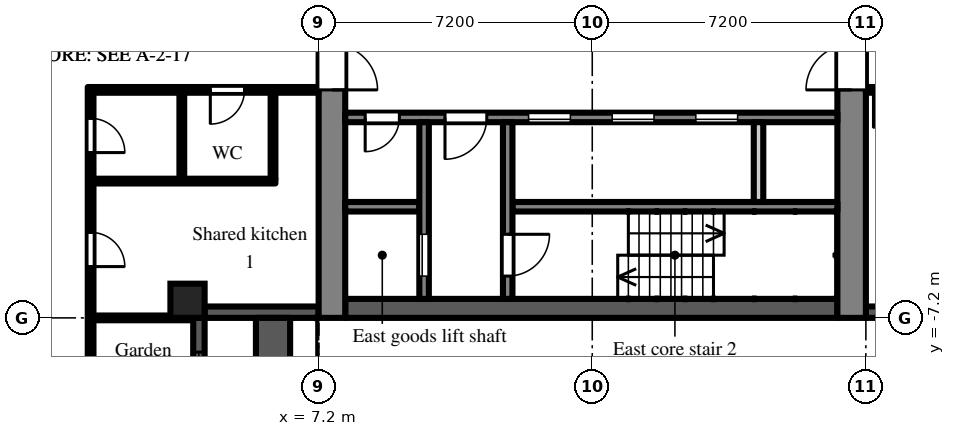
"""IFC4 building model, lengths in metres.
Left out: names, types, materials, properties, quantities, classifications, styles, units other than length and angle.
Written with IfcOpenShell. Run it as: python <this file> out.ifc"""

import sys

from ifc_helpers import new_model, si_unit, direction, frame, frame_2d, origin, origin_2d, place, context, subcontext, project, spatial, rectangle, extrude, element, fill, save


model = new_model("IFC4")
c1 = context("Model", 3, precision=1e-05, world=origin(), true_north=direction((0.0, 1.0)))
c2 = subcontext(c1, "Body", "Model", "MODEL_VIEW")
j1 = project(units=[si_unit("LENGTHUNIT", "METRE"), si_unit("PLANEANGLEUNIT", "RADIAN")], contexts=[c1])
p1 = place(None, origin())
s1 = spatial("IfcSite", under=j1, at=p1, CompositionType="ELEMENT")
p2 = place(p1, origin())
s2 = spatial("IfcBuilding", under=s1, at=p2, CompositionType="ELEMENT")
p3 = place(p2, frame((0.0, 0.0, 108.9)))
s3 = spatial("IfcBuildingStorey", under=s2, at=p3, CompositionType="ELEMENT", Elevation=108.9)
p4 = place(p3, frame((3.75, -6.75, 0.0), z_axis=(0.0, 0.0, 1.0), x_axis=(1.0, 0.0, 0.0)))
e1 = element("IfcColumn", 1, at=p4, inside=s3, PredefinedType="COLUMN", context=c2, shape_type="SweptSolid", body=[
    extrude(rectangle(XDim=0.9, YDim=0.9, at=origin_2d()), origin(), (0.0, 0.0, 1.0), 3.0),
])
p5 = place(p3, frame((21.6, -7.05, 0.0), z_axis=(0.0, 0.0, 1.0), x_axis=(1.0, 0.0, 0.0)))
e2 = element("IfcWall", 2, at=p5, inside=s3, PredefinedType="SOLIDWALL", context=c2, shape_type="SweptSolid", body=[
    extrude(rectangle(XDim=2.7, YDim=0.3, at=frame_2d((1.35, 0.0))), origin(), (0.0, 0.0, 1.0), 2.2),
])
p6 = place(p5, frame((0.75, 0.0, 0.2)))
e3 = element("IfcOpeningElement", 3, at=p6, cuts=e2, PredefinedType="OPENING", context=c2, shape_type="SweptSolid", body=[
    extrude(rectangle(XDim=1.2, YDim=1.85, at=frame_2d((0.6, 0.925))), frame((0.0, 0.16, 0.0), z_axis=(0.0, -1.0, 0.0), x_axis=(1.0, 0.0, 0.0)), (0.0, 0.0, 1.0), 0.32),
])
p7 = place(p3, frame((4.05, -14.4, 0.0), z_axis=(0.0, 0.0, 1.0), x_axis=(0.0, 1.0, 0.0)))
e4 = element("IfcWall", 4, at=p7, inside=s3, PredefinedType="SOLIDWALL", context=c2, shape_type="SweptSolid", body=[
    extrude(rectangle(XDim=7.2, YDim=0.3, at=frame_2d((3.6, 0.0))), origin(), (0.0, 0.0, 1.0), 2.55),
])
p8 = place(p7, frame((3.0, 0.0, 0.0)))
e5 = element("IfcOpeningElement", 5, at=p8, cuts=e4, PredefinedType="OPENING", context=c2, shape_type="SweptSolid", body=[
    extrude(rectangle(XDim=1.2, YDim=2.05, at=frame_2d((0.6, 1.025))), frame((0.0, 0.16, 0.0), z_axis=(0.0, -1.0, 0.0), x_axis=(1.0, 0.0, 0.0)), (0.0, 0.0, 1.0), 0.32),
])
p9 = place(p7, frame((0.9, 0.0, 0.2)))
e6 = element("IfcOpeningElement", 6, at=p9, cuts=e4, PredefinedType="OPENING", context=c2, shape_type="SweptSolid", body=[
    extrude(rectangle(XDim=1.8, YDim=1.85, at=frame_2d((0.9, 0.925))), frame((0.0, 0.16, 0.0), z_axis=(0.0, -1.0, 0.0), x_axis=(1.0, 0.0, 0.0)), (0.0, 0.0, 1.0), 0.32),
])
p10 = place(p7, frame((4.5, 0.0, 0.2)))
e7 = element("IfcOpeningElement", 7, at=p10, cuts=e4, PredefinedType="OPENING", context=c2, shape_type="SweptSolid", body=[
    extrude(rectangle(XDim=1.8, YDim=1.85, at=frame_2d((0.9, 0.925))), frame((0.0, 0.16, 0.0), z_axis=(0.0, -1.0, 0.0), x_axis=(1.0, 0.0, 0.0)), (0.0, 0.0, 1.0), 0.32),
])
p11 = place(p3, frame((4.2, -7.05, 0.0), z_axis=(0.0, 0.0, 1.0), x_axis=(1.0, 0.0, 0.0)))
e8 = element("IfcWall", 8, at=p11, inside=s3, PredefinedType="SOLIDWALL", context=c2, shape_type="SweptSolid", body=[
    extrude(rectangle(XDim=3.0, YDim=0.3, at=frame_2d((1.5, 0.0))), origin(), (0.0, 0.0, 1.0), 2.55),
])
p12 = place(p3, frame((6.0, -14.4, 0.0), z_axis=(0.0, 0.0, 1.0), x_axis=(0.0, 1.0, 0.0)))
e9 = element("IfcWall", 9, at=p12, inside=s3, PredefinedType="PARAPET", context=c2, shape_type="SweptSolid", body=[
    extrude(rectangle(XDim=7.2, YDim=0.9, at=frame_2d((3.6, 0.0))), origin(), (0.0, 0.0, 1.0), 0.8),
])
p13 = place(p3, frame((7.55, -7.2, 0.0), z_axis=(0.0, 0.0, 1.0), x_axis=(0.0, 1.0, 0.0)))
e10 = element("IfcWall", 10, at=p13, inside=s3, PredefinedType="SHEAR", context=c2, shape_type="SweptSolid", body=[
    extrude(rectangle(XDim=14.4, YDim=0.7, at=frame_2d((7.2, 0.0))), origin(), (0.0, 0.0, 1.0), 2.55),
])
p14 = place(p13, frame((6.0, 0.0, 0.0)))
e11 = element("IfcOpeningElement", 11, at=p14, cuts=e10, PredefinedType="OPENING", context=c2, shape_type="SweptSolid", body=[
    extrude(rectangle(XDim=2.4, YDim=2.2, at=frame_2d((1.2, 1.1))), frame((0.0, 0.36, 0.0), z_axis=(0.0, -1.0, 0.0), x_axis=(1.0, 0.0, 0.0)), (0.0, 0.0, 1.0), 0.72),
])
p15 = place(p3, frame((21.225, -7.2, 0.0), z_axis=(0.0, 0.0, 1.0), x_axis=(0.0, 1.0, 0.0)))
e12 = element("IfcWall", 12, at=p15, inside=s3, PredefinedType="SHEAR", context=c2, shape_type="SweptSolid", body=[
    extrude(rectangle(XDim=14.4, YDim=0.75, at=frame_2d((7.2, 0.0))), origin(), (0.0, 0.0, 1.0), 2.55),
])
p16 = place(p15, frame((6.0, 0.0, 0.0)))
e13 = element("IfcOpeningElement", 13, at=p16, cuts=e12, PredefinedType="OPENING", context=c2, shape_type="SweptSolid", body=[
    extrude(rectangle(XDim=2.4, YDim=2.2, at=frame_2d((1.2, 1.1))), frame((0.0, 0.385, 0.0), z_axis=(0.0, -1.0, 0.0), x_axis=(1.0, 0.0, 0.0)), (0.0, 0.0, 1.0), 0.77),
])
p17 = place(p3, frame((7.9, -6.95, 0.0), z_axis=(0.0, 0.0, 1.0), x_axis=(1.0, 0.0, 0.0)))
e14 = element("IfcWall", 14, at=p17, inside=s3, PredefinedType="SHEAR", context=c2, shape_type="SweptSolid", body=[
    extrude(rectangle(XDim=12.95, YDim=0.5, at=frame_2d((6.475, 0.0))), origin(), (0.0, 0.0, 1.0), 2.55),
])
p18 = place(p3, frame((7.9, -1.925, 0.0), z_axis=(0.0, 0.0, 1.0), x_axis=(1.0, 0.0, 0.0)))
e15 = element("IfcWall", 15, at=p18, inside=s3, PredefinedType="SHEAR", context=c2, shape_type="SweptSolid", body=[
    extrude(rectangle(XDim=12.95, YDim=0.25, at=frame_2d((6.475, 0.0))), origin(), (0.0, 0.0, 1.0), 2.55),
])
p19 = place(p18, frame((4.825, 0.0, 0.0)))
e16 = element("IfcOpeningElement", 16, at=p19, cuts=e15, PredefinedType="OPENING", context=c2, shape_type="SweptSolid", body=[
    extrude(rectangle(XDim=1.1, YDim=2.1, at=frame_2d((0.55, 1.05))), frame((0.0, 0.135, 0.0), z_axis=(0.0, -1.0, 0.0), x_axis=(1.0, 0.0, 0.0)), (0.0, 0.0, 1.0), 0.27),
])
p20 = place(p18, frame((7.025, 0.0, 0.0)))
e17 = element("IfcOpeningElement", 17, at=p20, cuts=e15, PredefinedType="OPENING", context=c2, shape_type="SweptSolid", body=[
    extrude(rectangle(XDim=1.1, YDim=2.1, at=frame_2d((0.55, 1.05))), frame((0.0, 0.135, 0.0), z_axis=(0.0, -1.0, 0.0), x_axis=(1.0, 0.0, 0.0)), (0.0, 0.0, 1.0), 0.27),
])
p21 = place(p18, frame((9.225, 0.0, 0.0)))
e18 = element("IfcOpeningElement", 18, at=p21, cuts=e15, PredefinedType="OPENING", context=c2, shape_type="SweptSolid", body=[
    extrude(rectangle(XDim=1.1, YDim=2.1, at=frame_2d((0.55, 1.05))), frame((0.0, 0.135, 0.0), z_axis=(0.0, -1.0, 0.0), x_axis=(1.0, 0.0, 0.0)), (0.0, 0.0, 1.0), 0.27),
])
p22 = place(p18, frame((0.525, 0.0, 0.0)))
e19 = element("IfcOpeningElement", 19, at=p22, cuts=e15, PredefinedType="OPENING", context=c2, shape_type="SweptSolid", body=[
    extrude(rectangle(XDim=0.9, YDim=2.1, at=frame_2d((0.45, 1.05))), frame((0.0, 0.135, 0.0), z_axis=(0.0, -1.0, 0.0), x_axis=(1.0, 0.0, 0.0)), (0.0, 0.0, 1.0), 0.27),
])
p23 = place(p18, frame((2.625, 0.0, 0.0)))
e20 = element("IfcOpeningElement", 20, at=p23, cuts=e15, PredefinedType="OPENING", context=c2, shape_type="SweptSolid", body=[
    extrude(rectangle(XDim=1.1, YDim=2.1, at=frame_2d((0.55, 1.05))), frame((0.0, 0.135, 0.0), z_axis=(0.0, -1.0, 0.0), x_axis=(1.0, 0.0, 0.0)), (0.0, 0.0, 1.0), 0.27),
])
p24 = place(p3, frame((7.9, -4.275, 0.0), z_axis=(0.0, 0.0, 1.0), x_axis=(1.0, 0.0, 0.0)))
e21 = element("IfcWall", 21, at=p24, inside=s3, PredefinedType="SHEAR", context=c2, shape_type="SweptSolid", body=[
    extrude(rectangle(XDim=1.95, YDim=0.25, at=frame_2d((0.975, 0.0))), origin(), (0.0, 0.0, 1.0), 2.55),
])
p25 = place(p3, frame((12.3, -4.275, 0.0), z_axis=(0.0, 0.0, 1.0), x_axis=(1.0, 0.0, 0.0)))
e22 = element("IfcWall", 22, at=p25, inside=s3, PredefinedType="SHEAR", context=c2, shape_type="SweptSolid", body=[
    extrude(rectangle(XDim=8.55, YDim=0.25, at=frame_2d((4.275, 0.0))), origin(), (0.0, 0.0, 1.0), 2.55),
])
p26 = place(p3, frame((9.975, -2.05, 0.0), z_axis=(0.0, 0.0, 1.0), x_axis=(0.0, -1.0, 0.0)))
e23 = element("IfcWall", 23, at=p26, inside=s3, PredefinedType="SHEAR", context=c2, shape_type="SweptSolid", body=[
    extrude(rectangle(XDim=4.65, YDim=0.25, at=frame_2d((2.325, 0.0))), origin(), (0.0, 0.0, 1.0), 2.55),
])
p27 = place(p26, frame((2.95, 0.0, 0.0)))
e24 = element("IfcOpeningElement", 24, at=p27, cuts=e23, PredefinedType="OPENING", context=c2, shape_type="SweptSolid", body=[
    extrude(rectangle(XDim=1.1, YDim=2.1, at=frame_2d((0.55, 1.05))), frame((0.0, 0.135, 0.0), z_axis=(0.0, -1.0, 0.0), x_axis=(1.0, 0.0, 0.0)), (0.0, 0.0, 1.0), 0.27),
])
p28 = place(p3, frame((12.175, -2.05, 0.0), z_axis=(0.0, 0.0, 1.0), x_axis=(0.0, -1.0, 0.0)))
e25 = element("IfcWall", 25, at=p28, inside=s3, PredefinedType="SHEAR", context=c2, shape_type="SweptSolid", body=[
    extrude(rectangle(XDim=4.65, YDim=0.25, at=frame_2d((2.325, 0.0))), origin(), (0.0, 0.0, 1.0), 2.55),
])
p29 = place(p28, frame((2.95, 0.0, 0.0)))
e26 = element("IfcOpeningElement", 26, at=p29, cuts=e25, PredefinedType="OPENING", context=c2, shape_type="SweptSolid", body=[
    extrude(rectangle(XDim=1.1, YDim=2.1, at=frame_2d((0.55, 1.05))), frame((0.0, 0.135, 0.0), z_axis=(0.0, -1.0, 0.0), x_axis=(1.0, 0.0, 0.0)), (0.0, 0.0, 1.0), 0.27),
])
p30 = place(p3, frame((18.775, -2.05, 0.0), z_axis=(0.0, 0.0, 1.0), x_axis=(0.0, -1.0, 0.0)))
e27 = element("IfcWall", 27, at=p30, inside=s3, PredefinedType="PARTITIONING", context=c2, shape_type="SweptSolid", body=[
    extrude(rectangle(XDim=2.1, YDim=0.25, at=frame_2d((1.05, 0.0))), origin(), (0.0, 0.0, 1.0), 2.55),
])
p31 = place(p3, frame((1.2, -36.5, 0.0), z_axis=(0.0, 0.0, 1.0), x_axis=(0.0, 1.0, 0.0)))
e28 = element("IfcWall", 28, at=p31, inside=s3, PredefinedType="PARTITIONING", context=c2, shape_type="SweptSolid", body=[
    extrude(rectangle(XDim=35.375, YDim=0.15, at=frame_2d((17.688, 0.0))), origin(), (0.0, 0.0, 1.0), 2.55),
])
p32 = place(p31, frame((33.65, 0.0, 0.0)))
e29 = element("IfcOpeningElement", 29, at=p32, cuts=e28, PredefinedType="OPENING", context=c2, shape_type="SweptSolid", body=[
    extrude(rectangle(XDim=0.9, YDim=2.1, at=frame_2d((0.45, 1.05))), frame((0.0, 0.085, 0.0), z_axis=(0.0, -1.0, 0.0), x_axis=(1.0, 0.0, 0.0)), (0.0, 0.0, 1.0), 0.17),
])
p33 = place(p31, frame((30.65, 0.0, 0.0)))
e30 = element("IfcOpeningElement", 30, at=p33, cuts=e28, PredefinedType="OPENING", context=c2, shape_type="SweptSolid", body=[
    extrude(rectangle(XDim=0.9, YDim=2.1, at=frame_2d((0.45, 1.05))), frame((0.0, 0.085, 0.0), z_axis=(0.0, -1.0, 0.0), x_axis=(1.0, 0.0, 0.0)), (0.0, 0.0, 1.0), 0.17),
])
p34 = place(p31, frame((23.45, 0.0, 0.0)))
e31 = element("IfcOpeningElement", 31, at=p34, cuts=e28, PredefinedType="OPENING", context=c2, shape_type="SweptSolid", body=[
    extrude(rectangle(XDim=0.9, YDim=2.1, at=frame_2d((0.45, 1.05))), frame((0.0, 0.085, 0.0), z_axis=(0.0, -1.0, 0.0), x_axis=(1.0, 0.0, 0.0)), (0.0, 0.0, 1.0), 0.17),
])
p35 = place(p31, frame((20.75, 0.0, 0.0)))
e32 = element("IfcOpeningElement", 32, at=p35, cuts=e28, PredefinedType="OPENING", context=c2, shape_type="SweptSolid", body=[
    extrude(rectangle(XDim=0.9, YDim=2.1, at=frame_2d((0.45, 1.05))), frame((0.0, 0.085, 0.0), z_axis=(0.0, -1.0, 0.0), x_axis=(1.0, 0.0, 0.0)), (0.0, 0.0, 1.0), 0.17),
])
p36 = place(p31, frame((18.95, 0.0, 0.0)))
e33 = element("IfcOpeningElement", 33, at=p36, cuts=e28, PredefinedType="OPENING", context=c2, shape_type="SweptSolid", body=[
    extrude(rectangle(XDim=0.9, YDim=2.1, at=frame_2d((0.45, 1.05))), frame((0.0, 0.085, 0.0), z_axis=(0.0, -1.0, 0.0), x_axis=(1.0, 0.0, 0.0)), (0.0, 0.0, 1.0), 0.17),
])
p37 = place(p31, frame((1.55, 0.0, 0.0)))
e34 = element("IfcOpeningElement", 34, at=p37, cuts=e28, PredefinedType="OPENING", context=c2, shape_type="SweptSolid", body=[
    extrude(rectangle(XDim=1.0, YDim=2.1, at=frame_2d((0.5, 1.05))), frame((0.0, 0.085, 0.0), z_axis=(0.0, -1.0, 0.0), x_axis=(1.0, 0.0, 0.0)), (0.0, 0.0, 1.0), 0.17),
])
p38 = place(p3, frame((1.275, -7.2, 0.0), z_axis=(0.0, 0.0, 1.0), x_axis=(1.0, 0.0, 0.0)))
e35 = element("IfcWall", 35, at=p38, inside=s3, PredefinedType="PARTITIONING", context=c2, shape_type="SweptSolid", body=[
    extrude(rectangle(XDim=2.625, YDim=0.125, at=frame_2d((1.312, 0.0))), origin(), (0.0, 0.0, 1.0), 2.55),
])
p39 = place(p3, frame((1.275, -3.6, 0.0), z_axis=(0.0, 0.0, 1.0), x_axis=(1.0, 0.0, 0.0)))
e36 = element("IfcWall", 36, at=p39, inside=s3, PredefinedType="PARTITIONING", context=c2, shape_type="SweptSolid", body=[
    extrude(rectangle(XDim=4.788, YDim=0.125, at=frame_2d((2.394, 0.0))), origin(), (0.0, 0.0, 1.0), 2.55),
])
p40 = place(p3, frame((1.275, -1.2, 0.0), z_axis=(0.0, 0.0, 1.0), x_axis=(1.0, 0.0, 0.0)))
e37 = element("IfcWall", 37, at=p40, inside=s3, PredefinedType="PARTITIONING", context=c2, shape_type="SweptSolid", body=[
    extrude(rectangle(XDim=5.925, YDim=0.15, at=frame_2d((2.962, 0.0))), origin(), (0.0, 0.0, 1.0), 2.55),
])
p41 = place(p40, frame((3.075, 0.0, 0.0)))
e38 = element("IfcOpeningElement", 38, at=p41, cuts=e37, PredefinedType="OPENING", context=c2, shape_type="SweptSolid", body=[
    extrude(rectangle(XDim=0.9, YDim=2.1, at=frame_2d((0.45, 1.05))), frame((0.0, 0.085, 0.0), z_axis=(0.0, -1.0, 0.0), x_axis=(1.0, 0.0, 0.0)), (0.0, 0.0, 1.0), 0.17),
])
for number, where, z_axis, x_axis in (
    (39, (3.6, -3.538, 0.0), (0.0, 0.0, 1.0), (0.0, 1.0, 0.0)),
    (40, (6.0, -3.538, 0.0), (0.0, 0.0, 1.0), (0.0, 1.0, 0.0)),
):
    element("IfcWall", number, at=place(p3, frame(where, z_axis=z_axis, x_axis=x_axis)), inside=s3, PredefinedType="PARTITIONING", context=c2, shape_type="SweptSolid", body=[
        extrude(rectangle(XDim=2.263, YDim=0.125, at=frame_2d((1.131, 0.0))), origin(), (0.0, 0.0, 1.0), 2.55),
    ])
p42 = place(p3, frame((21.6, -1.2, 0.0), z_axis=(0.0, 0.0, 1.0), x_axis=(1.0, 0.0, 0.0)))
e41 = element("IfcWall", 41, at=p42, inside=s3, PredefinedType="PARTITIONING", context=c2, shape_type="SweptSolid", body=[
    extrude(rectangle(XDim=14.9, YDim=0.15, at=frame_2d((7.45, 0.0))), origin(), (0.0, 0.0, 1.0), 2.55),
])
p43 = place(p42, frame((0.2, 0.0, 0.0)))
e42 = element("IfcOpeningElement", 42, at=p43, cuts=e41, PredefinedType="OPENING", context=c2, shape_type="SweptSolid", body=[
    extrude(rectangle(XDim=1.0, YDim=2.1, at=frame_2d((0.5, 1.05))), frame((0.0, 0.085, 0.0), z_axis=(0.0, -1.0, 0.0), x_axis=(1.0, 0.0, 0.0)), (0.0, 0.0, 1.0), 0.17),
])
p44 = place(p42, frame((5.71, 0.0, 0.0)))
e43 = element("IfcOpeningElement", 43, at=p44, cuts=e41, PredefinedType="OPENING", context=c2, shape_type="SweptSolid", body=[
    extrude(rectangle(XDim=1.0, YDim=2.1, at=frame_2d((0.5, 1.05))), frame((0.0, 0.085, 0.0), z_axis=(0.0, -1.0, 0.0), x_axis=(1.0, 0.0, 0.0)), (0.0, 0.0, 1.0), 0.17),
])
p45 = place(p42, frame((11.95, 0.0, 0.0)))
e44 = element("IfcOpeningElement", 44, at=p45, cuts=e41, PredefinedType="OPENING", context=c2, shape_type="SweptSolid", body=[
    extrude(rectangle(XDim=1.8, YDim=2.1, at=frame_2d((0.9, 1.05))), frame((0.0, 0.085, 0.0), z_axis=(0.0, -1.0, 0.0), x_axis=(1.0, 0.0, 0.0)), (0.0, 0.0, 1.0), 0.17),
])
p46 = place(p10, origin())
e45 = element("IfcWindow", 45, at=p46, inside=s3, PartitioningType="SINGLE_PANEL", PredefinedType="WINDOW", context=c2, shape_type="SweptSolid", body=[
    extrude(rectangle(XDim=1.8, YDim=1.85, at=frame_2d((0.9, 0.925))), frame((0.0, 0.03, 0.0), z_axis=(0.0, -1.0, 0.0), x_axis=(1.0, 0.0, 0.0)), (0.0, 0.0, 1.0), 0.06),
])
fill(e7, e45)
p47 = place(p19, origin())
e46 = element("IfcDoor", 46, at=p47, inside=s3, OperationType="SLIDING_TO_LEFT", PredefinedType="DOOR", context=c2, shape_type="SweptSolid", body=[
    extrude(rectangle(XDim=1.1, YDim=2.1, at=frame_2d((0.55, 1.05))), frame((0.0, 0.025, 0.0), z_axis=(0.0, -1.0, 0.0), x_axis=(1.0, 0.0, 0.0)), (0.0, 0.0, 1.0), 0.05),
])
fill(e16, e46)
p48 = place(p20, origin())
e47 = element("IfcDoor", 47, at=p48, inside=s3, OperationType="SLIDING_TO_LEFT", PredefinedType="DOOR", context=c2, shape_type="SweptSolid", body=[
    extrude(rectangle(XDim=1.1, YDim=2.1, at=frame_2d((0.55, 1.05))), frame((0.0, 0.025, 0.0), z_axis=(0.0, -1.0, 0.0), x_axis=(1.0, 0.0, 0.0)), (0.0, 0.0, 1.0), 0.05),
])
fill(e17, e47)
p49 = place(p21, origin())
e48 = element("IfcDoor", 48, at=p49, inside=s3, OperationType="SLIDING_TO_LEFT", PredefinedType="DOOR", context=c2, shape_type="SweptSolid", body=[
    extrude(rectangle(XDim=1.1, YDim=2.1, at=frame_2d((0.55, 1.05))), frame((0.0, 0.025, 0.0), z_axis=(0.0, -1.0, 0.0), x_axis=(1.0, 0.0, 0.0)), (0.0, 0.0, 1.0), 0.05),
])
fill(e18, e48)
p50 = place(p27, origin())
e49 = element("IfcDoor", 49, at=p50, inside=s3, OperationType="SLIDING_TO_LEFT", PredefinedType="DOOR", context=c2, shape_type="SweptSolid", body=[
    extrude(rectangle(XDim=1.1, YDim=2.1, at=frame_2d((0.55, 1.05))), frame((0.0, 0.025, 0.0), z_axis=(0.0, -1.0, 0.0), x_axis=(1.0, 0.0, 0.0)), (0.0, 0.0, 1.0), 0.05),
])
fill(e24, e49)
p51 = place(p29, origin())
e50 = element("IfcDoor", 50, at=p51, inside=s3, OperationType="SINGLE_SWING_LEFT", PredefinedType="DOOR", context=c2, shape_type="SweptSolid", body=[
    extrude(rectangle(XDim=1.1, YDim=2.1, at=frame_2d((0.55, 1.05))), frame((0.0, 0.025, 0.0), z_axis=(0.0, -1.0, 0.0), x_axis=(1.0, 0.0, 0.0)), (0.0, 0.0, 1.0), 0.05),
])
fill(e26, e50)
p52 = place(p22, frame((0.9, 0.0, 0.0), z_axis=(0.0, 0.0, 1.0), x_axis=(-1.0, 0.0, 0.0)))
e51 = element("IfcDoor", 51, at=p52, inside=s3, OperationType="SINGLE_SWING_RIGHT", PredefinedType="DOOR", context=c2, shape_type="SweptSolid", body=[
    extrude(rectangle(XDim=0.9, YDim=2.1, at=frame_2d((0.45, 1.05))), frame((0.0, 0.025, 0.0), z_axis=(0.0, -1.0, 0.0), x_axis=(1.0, 0.0, 0.0)), (0.0, 0.0, 1.0), 0.05),
])
fill(e19, e51)
p53 = place(p23, frame((1.1, 0.0, 0.0), z_axis=(0.0, 0.0, 1.0), x_axis=(-1.0, 0.0, 0.0)))
e52 = element("IfcDoor", 52, at=p53, inside=s3, OperationType="SINGLE_SWING_RIGHT", PredefinedType="DOOR", context=c2, shape_type="SweptSolid", body=[
    extrude(rectangle(XDim=1.1, YDim=2.1, at=frame_2d((0.55, 1.05))), frame((0.0, 0.025, 0.0), z_axis=(0.0, -1.0, 0.0), x_axis=(1.0, 0.0, 0.0)), (0.0, 0.0, 1.0), 0.05),
])
fill(e20, e52)
p54 = place(p14, frame((2.4, 0.0, 0.0), z_axis=(0.0, 0.0, 1.0), x_axis=(-1.0, 0.0, 0.0)))
e53 = element("IfcDoor", 53, at=p54, inside=s3, OperationType="DOUBLE_DOOR_DOUBLE_SWING", PredefinedType="DOOR", context=c2, shape_type="SweptSolid", body=[
    extrude(rectangle(XDim=2.4, YDim=2.2, at=frame_2d((1.2, 1.1))), frame((0.0, 0.025, 0.0), z_axis=(0.0, -1.0, 0.0), x_axis=(1.0, 0.0, 0.0)), (0.0, 0.0, 1.0), 0.05),
])
fill(e11, e53)
p55 = place(p16, origin())
e54 = element("IfcDoor", 54, at=p55, inside=s3, OperationType="DOUBLE_DOOR_DOUBLE_SWING", PredefinedType="DOOR", context=c2, shape_type="SweptSolid", body=[
    extrude(rectangle(XDim=2.4, YDim=2.2, at=frame_2d((1.2, 1.1))), frame((0.0, 0.025, 0.0), z_axis=(0.0, -1.0, 0.0), x_axis=(1.0, 0.0, 0.0)), (0.0, 0.0, 1.0), 0.05),
])
fill(e13, e54)
p56 = place(p32, frame((0.9, 0.0, 0.0), z_axis=(0.0, 0.0, 1.0), x_axis=(-1.0, 0.0, 0.0)))
e55 = element("IfcDoor", 55, at=p56, inside=s3, OperationType="SINGLE_SWING_RIGHT", PredefinedType="DOOR", context=c2, shape_type="SweptSolid", body=[
    extrude(rectangle(XDim=0.9, YDim=2.1, at=frame_2d((0.45, 1.05))), frame((0.0, 0.025, 0.0), z_axis=(0.0, -1.0, 0.0), x_axis=(1.0, 0.0, 0.0)), (0.0, 0.0, 1.0), 0.05),
])
fill(e29, e55)
p57 = place(p41, frame((0.9, 0.0, 0.0), z_axis=(0.0, 0.0, 1.0), x_axis=(-1.0, 0.0, 0.0)))
e56 = element("IfcDoor", 56, at=p57, inside=s3, OperationType="SINGLE_SWING_RIGHT", PredefinedType="DOOR", context=c2, shape_type="SweptSolid", body=[
    extrude(rectangle(XDim=0.9, YDim=2.1, at=frame_2d((0.45, 1.05))), frame((0.0, 0.025, 0.0), z_axis=(0.0, -1.0, 0.0), x_axis=(1.0, 0.0, 0.0)), (0.0, 0.0, 1.0), 0.05),
])
fill(e38, e56)
p58 = place(p33, frame((0.9, 0.0, 0.0), z_axis=(0.0, 0.0, 1.0), x_axis=(-1.0, 0.0, 0.0)))
e57 = element("IfcDoor", 57, at=p58, inside=s3, OperationType="SINGLE_SWING_RIGHT", PredefinedType="DOOR", context=c2, shape_type="SweptSolid", body=[
    extrude(rectangle(XDim=0.9, YDim=2.1, at=frame_2d((0.45, 1.05))), frame((0.0, 0.025, 0.0), z_axis=(0.0, -1.0, 0.0), x_axis=(1.0, 0.0, 0.0)), (0.0, 0.0, 1.0), 0.05),
])
fill(e30, e57)
p59 = place(p43, frame((1.0, 0.0, 0.0), z_axis=(0.0, 0.0, 1.0), x_axis=(-1.0, 0.0, 0.0)))
e58 = element("IfcDoor", 58, at=p59, inside=s3, OperationType="SINGLE_SWING_RIGHT", PredefinedType="DOOR", context=c2, shape_type="SweptSolid", body=[
    extrude(rectangle(XDim=1.0, YDim=2.1, at=frame_2d((0.5, 1.05))), frame((0.0, 0.025, 0.0), z_axis=(0.0, -1.0, 0.0), x_axis=(1.0, 0.0, 0.0)), (0.0, 0.0, 1.0), 0.05),
])
fill(e42, e58)
save(model, sys.argv[1])
